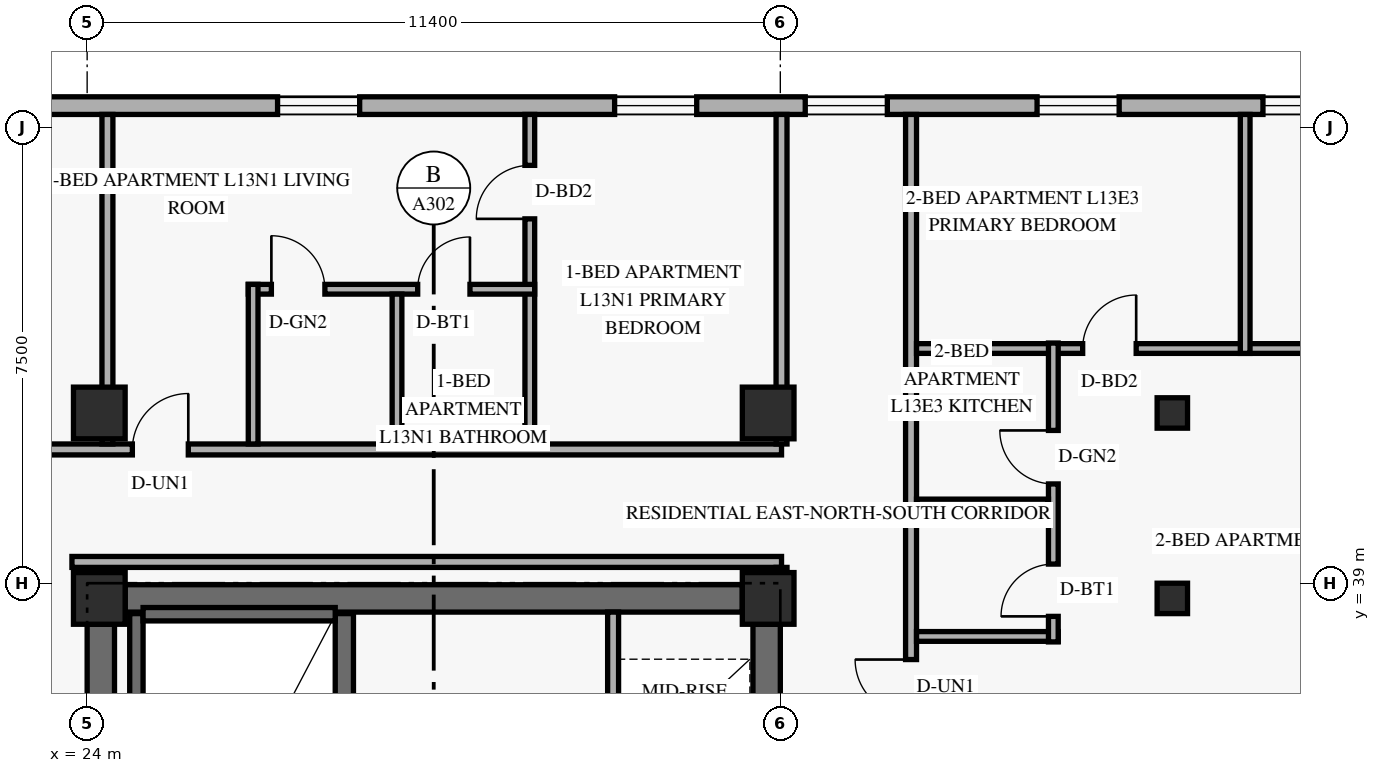
"""IFC4 building model, lengths in metres.
Left out: names, types, materials, properties, quantities, classifications, styles, units other than length and angle.
Written with IfcOpenShell. Run it as: python <this file> out.ifc"""

import sys

from ifc_helpers import new_model, si_unit, direction, frame, frame_2d, origin, origin_2d, place, context, subcontext, project, spatial, rectangle, hollow_rectangle, extrude, element, fill, save


model = new_model("IFC4")
c1 = context("Model", 3, precision=1e-05, world=origin(), true_north=direction((0.0, 1.0)))
c2 = subcontext(c1, "Body", "Model", "MODEL_VIEW")
j1 = project(units=[si_unit("LENGTHUNIT", "METRE"), si_unit("PLANEANGLEUNIT", "RADIAN")], contexts=[c1])
p1 = place(None, origin())
s1 = spatial("IfcSite", under=j1, at=p1, CompositionType="ELEMENT")
p2 = place(p1, origin())
s2 = spatial("IfcBuilding", under=s1, at=p2, CompositionType="ELEMENT")
p3 = place(p2, frame((0.0, 0.0, 52.8)))
s3 = spatial("IfcBuildingStorey", under=s2, at=p3, CompositionType="ELEMENT", Elevation=52.8)
p4 = place(p3, frame((24.225, 30.625, 0.0), z_axis=(0.0, 0.0, 1.0), x_axis=(0.0, 1.0, 0.0)))
e1 = element("IfcWall", 1, at=p4, inside=s3, PredefinedType="SHEAR", context=c2, shape_type="SweptSolid", body=[
    extrude(rectangle(XDim=7.7, YDim=0.45, at=frame_2d((3.85, 0.0))), origin(), (0.0, 0.0, 1.0), 2.667),
])
p5 = place(p3, frame((35.175, 31.35, 0.0), z_axis=(0.0, 0.0, 1.0), x_axis=(0.0, 1.0, 0.0)))
e2 = element("IfcWall", 2, at=p5, inside=s3, PredefinedType="SHEAR", context=c2, shape_type="SweptSolid", body=[
    extrude(rectangle(XDim=6.975, YDim=0.45, at=frame_2d((3.487, 0.0))), origin(), (0.0, 0.0, 1.0), 2.667),
])
p6 = place(p3, frame((24.625, 38.75, 0.0), z_axis=(0.0, 0.0, 1.0), x_axis=(1.0, 0.0, 0.0)))
e3 = element("IfcWall", 3, at=p6, inside=s3, PredefinedType="SHEAR", context=c2, shape_type="SweptSolid", body=[
    extrude(rectangle(XDim=10.15, YDim=0.45, at=frame_2d((5.075, 0.0))), origin(), (0.0, 0.0, 1.0), 3.36),
])
p7 = place(p3, frame((24.81, 30.74, 0.0), z_axis=(0.0, 0.0, 1.0), x_axis=(0.0, 1.0, 0.0)))
e4 = element("IfcWall", 4, at=p7, inside=s3, PredefinedType="SHEAR", context=c2, shape_type="SweptSolid", body=[
    extrude(rectangle(XDim=7.76, YDim=0.22, at=frame_2d((3.88, 0.0))), origin(), (0.0, 0.0, 1.0), 3.36),
])
p8 = place(p3, frame((28.23, 30.74, 0.0), z_axis=(0.0, 0.0, 1.0), x_axis=(0.0, 1.0, 0.0)))
e5 = element("IfcWall", 5, at=p8, inside=s3, PredefinedType="SHEAR", context=c2, shape_type="SweptSolid", body=[
    extrude(rectangle(XDim=7.76, YDim=0.3, at=frame_2d((3.88, 0.0))), origin(), (0.0, 0.0, 1.0), 3.36),
])
p9 = place(p3, frame((24.92, 38.49, 0.0), z_axis=(0.0, 0.0, 1.0), x_axis=(1.0, 0.0, 0.0)))
e6 = element("IfcWall", 6, at=p9, inside=s3, PredefinedType="SHEAR", context=c2, shape_type="SweptSolid", body=[
    extrude(rectangle(XDim=3.16, YDim=0.22, at=frame_2d((1.58, 0.0))), origin(), (0.0, 0.0, 1.0), 3.36),
])
for number, where, z_axis, x_axis in (
    (7, (24.2, 38.75, 0.0), (0.0, 0.0, 1.0), (1.0, 0.0, 0.0)),
    (8, (24.2, 41.8, 0.0), (0.0, 0.0, 1.0), (1.0, 0.0, 0.0)),
    (9, (35.2, 38.75, 0.0), (0.0, 0.0, 1.0), (1.0, 0.0, 0.0)),
    (10, (35.2, 41.8, 0.0), (0.0, 0.0, 1.0), (1.0, 0.0, 0.0)),
):
    element("IfcColumn", number, at=place(p3, frame(where, z_axis=z_axis, x_axis=x_axis)), inside=s3, PredefinedType="COLUMN", context=c2, shape_type="SweptSolid", body=[
        extrude(rectangle(XDim=0.85, YDim=0.85, at=origin_2d()), origin(), (0.0, 0.0, 1.0), 3.6),
    ])
for number, where, z_axis, x_axis in (
    (11, (41.784, 38.75, 0.0), (0.035, 0.0, 0.999), (0.0, 1.0, 0.0)),
    (12, (41.784, 41.8, 0.0), (0.035, 0.0, 0.999), (0.0, 1.0, 0.0)),
):
    element("IfcColumn", number, at=place(p3, frame(where, z_axis=z_axis, x_axis=x_axis)), inside=s3, PredefinedType="COLUMN", context=c2, shape_type="SweptSolid", body=[
        extrude(hollow_rectangle(XDim=0.5, YDim=0.5, WallThickness=0.022, at=origin_2d()), origin(), (0.0, 0.0, 1.0), 3.602),
    ])
p10 = place(p3, frame((44.98, 46.855, 0.0), z_axis=(0.0, 0.0, 1.0), x_axis=(-1.0, 0.0, 0.0)))
e13 = element("IfcWall", 13, at=p10, inside=s3, PredefinedType="SOLIDWALL", context=c2, shape_type="SweptSolid", body=[
    extrude(rectangle(XDim=39.56, YDim=0.29, at=frame_2d((19.78, 0.0))), origin(), (0.0, 0.0, 1.0), 3.36),
])
p11 = place(p10, frame((35.445, 0.0, 0.85)))
e14 = element("IfcOpeningElement", 14, at=p11, cuts=e13, PredefinedType="OPENING", context=c2, shape_type="SweptSolid", body=[
    extrude(rectangle(XDim=1.35, YDim=1.55, at=frame_2d((0.675, 0.775))), frame((0.0, 0.155, 0.0), z_axis=(0.0, -1.0, 0.0), x_axis=(1.0, 0.0, 0.0)), (0.0, 0.0, 1.0), 0.31),
])
p12 = place(p10, frame((31.18, 0.0, 0.85)))
e15 = element("IfcOpeningElement", 15, at=p12, cuts=e13, PredefinedType="OPENING", context=c2, shape_type="SweptSolid", body=[
    extrude(rectangle(XDim=1.2, YDim=1.5, at=frame_2d((0.6, 0.75))), frame((0.0, 0.155, 0.0), z_axis=(0.0, -1.0, 0.0), x_axis=(1.0, 0.0, 0.0)), (0.0, 0.0, 1.0), 0.31),
])
p13 = place(p10, frame((25.088, 0.0, 0.85)))
e16 = element("IfcOpeningElement", 16, at=p13, cuts=e13, PredefinedType="OPENING", context=c2, shape_type="SweptSolid", body=[
    extrude(rectangle(XDim=1.35, YDim=1.55, at=frame_2d((0.675, 0.775))), frame((0.0, 0.155, 0.0), z_axis=(0.0, -1.0, 0.0), x_axis=(1.0, 0.0, 0.0)), (0.0, 0.0, 1.0), 0.31),
])
p14 = place(p10, frame((16.498, 0.0, 0.85)))
e17 = element("IfcOpeningElement", 17, at=p14, cuts=e13, PredefinedType="OPENING", context=c2, shape_type="SweptSolid", body=[
    extrude(rectangle(XDim=1.35, YDim=1.55, at=frame_2d((0.675, 0.775))), frame((0.0, 0.155, 0.0), z_axis=(0.0, -1.0, 0.0), x_axis=(1.0, 0.0, 0.0)), (0.0, 0.0, 1.0), 0.31),
])
p15 = place(p10, frame((10.955, 0.0, 0.85)))
e18 = element("IfcOpeningElement", 18, at=p15, cuts=e13, PredefinedType="OPENING", context=c2, shape_type="SweptSolid", body=[
    extrude(rectangle(XDim=1.35, YDim=1.55, at=frame_2d((0.675, 0.775))), frame((0.0, 0.155, 0.0), z_axis=(0.0, -1.0, 0.0), x_axis=(1.0, 0.0, 0.0)), (0.0, 0.0, 1.0), 0.31),
])
p16 = place(p10, frame((7.82, 0.0, 0.85)))
e19 = element("IfcOpeningElement", 19, at=p16, cuts=e13, PredefinedType="OPENING", context=c2, shape_type="SweptSolid", body=[
    extrude(rectangle(XDim=1.35, YDim=1.55, at=frame_2d((0.675, 0.775))), frame((0.0, 0.155, 0.0), z_axis=(0.0, -1.0, 0.0), x_axis=(1.0, 0.0, 0.0)), (0.0, 0.0, 1.0), 0.31),
])
p17 = place(p10, frame((4.008, 0.0, 0.85)))
e20 = element("IfcOpeningElement", 20, at=p17, cuts=e13, PredefinedType="OPENING", context=c2, shape_type="SweptSolid", body=[
    extrude(rectangle(XDim=1.35, YDim=1.55, at=frame_2d((0.675, 0.775))), frame((0.0, 0.155, 0.0), z_axis=(0.0, -1.0, 0.0), x_axis=(1.0, 0.0, 0.0)), (0.0, 0.0, 1.0), 0.31),
])
p18 = place(p10, frame((0.292, 0.0, 0.85)))
e21 = element("IfcOpeningElement", 21, at=p18, cuts=e13, PredefinedType="OPENING", context=c2, shape_type="SweptSolid", body=[
    extrude(rectangle(XDim=1.35, YDim=1.55, at=frame_2d((0.675, 0.775))), frame((0.0, 0.155, 0.0), z_axis=(0.0, -1.0, 0.0), x_axis=(1.0, 0.0, 0.0)), (0.0, 0.0, 1.0), 0.31),
])
p19 = place(p3, frame((32.65, 31.35, 0.0), z_axis=(0.0, 0.0, 1.0), x_axis=(0.0, 1.0, 0.0)))
e22 = element("IfcWall", 22, at=p19, inside=s3, PredefinedType="STANDARD", context=c2, shape_type="SweptSolid", body=[
    extrude(rectangle(XDim=7.175, YDim=0.18, at=frame_2d((3.587, 0.0))), origin(), (0.0, 0.0, 1.0), 3.36),
])
p20 = place(p3, frame((37.55, 1.29, 0.0), z_axis=(0.0, 0.0, 1.0), x_axis=(0.0, 1.0, 0.0)))
e23 = element("IfcWall", 23, at=p20, inside=s3, PredefinedType="STANDARD", context=c2, shape_type="SweptSolid", body=[
    extrude(rectangle(XDim=45.42, YDim=0.18, at=frame_2d((22.71, 0.0))), origin(), (0.0, 0.0, 1.0), 2.649),
])
p21 = place(p20, frame((9.87, 0.0, 0.0)))
e24 = element("IfcOpeningElement", 24, at=p21, cuts=e23, PredefinedType="OPENING", context=c2, shape_type="SweptSolid", body=[
    extrude(rectangle(XDim=0.92, YDim=2.15, at=frame_2d((0.46, 1.075))), frame((0.0, 0.1, 0.0), z_axis=(0.0, -1.0, 0.0), x_axis=(1.0, 0.0, 0.0)), (0.0, 0.0, 1.0), 0.2),
])
p22 = place(p20, frame((20.953, 0.0, 0.0)))
e25 = element("IfcOpeningElement", 25, at=p22, cuts=e23, PredefinedType="OPENING", context=c2, shape_type="SweptSolid", body=[
    extrude(rectangle(XDim=0.92, YDim=2.15, at=frame_2d((0.46, 1.075))), frame((0.0, 0.1, 0.0), z_axis=(0.0, -1.0, 0.0), x_axis=(1.0, 0.0, 0.0)), (0.0, 0.0, 1.0), 0.2),
])
p23 = place(p20, frame((35.534, 0.0, 0.0)))
e26 = element("IfcOpeningElement", 26, at=p23, cuts=e23, PredefinedType="OPENING", context=c2, shape_type="SweptSolid", body=[
    extrude(rectangle(XDim=0.92, YDim=2.15, at=frame_2d((0.46, 1.075))), frame((0.0, 0.1, 0.0), z_axis=(0.0, -1.0, 0.0), x_axis=(1.0, 0.0, 0.0)), (0.0, 0.0, 1.0), 0.2),
])
p24 = place(p3, frame((14.1, 41.2, 0.0), z_axis=(0.0, 0.0, 1.0), x_axis=(1.0, 0.0, 0.0)))
e27 = element("IfcWall", 27, at=p24, inside=s3, PredefinedType="STANDARD", context=c2, shape_type="SweptSolid", body=[
    extrude(rectangle(XDim=21.32, YDim=0.18, at=frame_2d((10.66, 0.0))), origin(), (0.0, 0.0, 1.0), 2.649),
])
p25 = place(p24, frame((1.6, 0.0, 0.0)))
e28 = element("IfcOpeningElement", 28, at=p25, cuts=e27, PredefinedType="OPENING", context=c2, shape_type="SweptSolid", body=[
    extrude(rectangle(XDim=0.95, YDim=2.15, at=frame_2d((0.475, 1.075))), frame((0.0, 0.1, 0.0), z_axis=(0.0, -1.0, 0.0), x_axis=(1.0, 0.0, 0.0)), (0.0, 0.0, 1.0), 0.2),
])
p26 = place(p24, frame((10.644, 0.0, 0.0)))
e29 = element("IfcOpeningElement", 29, at=p26, cuts=e27, PredefinedType="OPENING", context=c2, shape_type="SweptSolid", body=[
    extrude(rectangle(XDim=0.92, YDim=2.15, at=frame_2d((0.46, 1.075))), frame((0.0, 0.1, 0.0), z_axis=(0.0, -1.0, 0.0), x_axis=(1.0, 0.0, 0.0)), (0.0, 0.0, 1.0), 0.2),
])
p27 = place(p3, frame((23.75, 39.35, 0.0), z_axis=(0.0, 0.0, 1.0), x_axis=(1.0, 0.0, 0.0)))
e30 = element("IfcWall", 30, at=p27, inside=s3, PredefinedType="STANDARD", context=c2, shape_type="SweptSolid", body=[
    extrude(rectangle(XDim=11.67, YDim=0.18, at=frame_2d((5.835, 0.0))), origin(), (0.0, 0.0, 1.0), 2.649),
])
p28 = place(p3, frame((35.42, 38.75, 0.0), z_axis=(0.0, 0.0, 1.0), x_axis=(0.0, 1.0, 0.0)))
e31 = element("IfcWall", 31, at=p28, inside=s3, PredefinedType="STANDARD", context=c2, shape_type="SweptSolid", body=[
    extrude(rectangle(XDim=0.51, YDim=0.18, at=frame_2d((0.255, 0.0))), origin(), (0.0, 0.0, 1.0), 3.36),
])
p29 = place(p3, frame((35.42, 41.29, 0.0), z_axis=(0.0, 0.0, 1.0), x_axis=(0.0, 1.0, 0.0)))
e32 = element("IfcWall", 32, at=p29, inside=s3, PredefinedType="PARTITIONING", context=c2, shape_type="SweptSolid", body=[
    extrude(rectangle(XDim=5.42, YDim=0.18, at=frame_2d((2.71, 0.0))), origin(), (0.0, 0.0, 1.0), 3.36),
])
p30 = place(p3, frame((37.64, 42.86, 0.0), z_axis=(0.0, 0.0, 1.0), x_axis=(1.0, 0.0, 0.0)))
e33 = element("IfcWall", 33, at=p30, inside=s3, PredefinedType="PARTITIONING", context=c2, shape_type="SweptSolid", body=[
    extrude(rectangle(XDim=10.67, YDim=0.16, at=frame_2d((5.335, 0.0))), origin(), (0.0, 0.0, 1.0), 3.36),
])
p31 = place(p30, frame((2.732, 0.0, 0.0)))
e34 = element("IfcOpeningElement", 34, at=p31, cuts=e33, PredefinedType="OPENING", context=c2, shape_type="SweptSolid", body=[
    extrude(rectangle(XDim=0.88, YDim=2.14, at=frame_2d((0.44, 1.07))), frame((0.0, 0.09, 0.0), z_axis=(0.0, -1.0, 0.0), x_axis=(1.0, 0.0, 0.0)), (0.0, 0.0, 1.0), 0.18),
])
p32 = place(p30, frame((8.833, 0.0, 0.0)))
e35 = element("IfcOpeningElement", 35, at=p32, cuts=e33, PredefinedType="OPENING", context=c2, shape_type="SweptSolid", body=[
    extrude(rectangle(XDim=0.88, YDim=2.14, at=frame_2d((0.44, 1.07))), frame((0.0, 0.09, 0.0), z_axis=(0.0, -1.0, 0.0), x_axis=(1.0, 0.0, 0.0)), (0.0, 0.0, 1.0), 0.18),
])
p33 = place(p3, frame((37.64, 38.125, 0.0), z_axis=(0.0, 0.0, 1.0), x_axis=(1.0, 0.0, 0.0)))
e36 = element("IfcWall", 36, at=p33, inside=s3, PredefinedType="PLUMBINGWALL", context=c2, shape_type="SweptSolid", body=[
    extrude(rectangle(XDim=2.33, YDim=0.16, at=frame_2d((1.165, 0.0))), origin(), (0.0, 0.0, 1.0), 3.36),
])
p34 = place(p3, frame((39.89, 38.034, 0.0), z_axis=(0.0, 0.0, 1.0), x_axis=(0.0, 1.0, 0.0)))
e37 = element("IfcWall", 37, at=p34, inside=s3, PredefinedType="PLUMBINGWALL", context=c2, shape_type="SweptSolid", body=[
    extrude(rectangle(XDim=4.916, YDim=0.16, at=frame_2d((2.458, 0.0))), origin(), (0.0, 0.0, 1.0), 2.649),
])
p35 = place(p34, frame((0.42, 0.0, 0.0)))
e38 = element("IfcOpeningElement", 38, at=p35, cuts=e37, PredefinedType="OPENING", context=c2, shape_type="SweptSolid", body=[
    extrude(rectangle(XDim=0.86, YDim=2.12, at=frame_2d((0.43, 1.06))), frame((0.0, 0.09, 0.0), z_axis=(0.0, -1.0, 0.0), x_axis=(1.0, 0.0, 0.0)), (0.0, 0.0, 1.0), 0.18),
])
p36 = place(p34, frame((2.598, 0.0, 0.0)))
e39 = element("IfcOpeningElement", 39, at=p36, cuts=e37, PredefinedType="OPENING", context=c2, shape_type="SweptSolid", body=[
    extrude(rectangle(XDim=0.88, YDim=2.12, at=frame_2d((0.44, 1.06))), frame((0.0, 0.09, 0.0), z_axis=(0.0, -1.0, 0.0), x_axis=(1.0, 0.0, 0.0)), (0.0, 0.0, 1.0), 0.18),
])
p37 = place(p3, frame((37.64, 40.303, 0.0), z_axis=(0.0, 0.0, 1.0), x_axis=(1.0, 0.0, 0.0)))
e40 = element("IfcWall", 40, at=p37, inside=s3, PredefinedType="PLUMBINGWALL", context=c2, shape_type="SweptSolid", body=[
    extrude(rectangle(XDim=2.17, YDim=0.16, at=frame_2d((1.085, 0.0))), origin(), (0.0, 0.0, 1.0), 3.36),
])
p38 = place(p3, frame((43.045, 42.78, 0.0), z_axis=(0.0, 0.0, 1.0), x_axis=(0.0, 1.0, 0.0)))
e41 = element("IfcWall", 41, at=p38, inside=s3, PredefinedType="PARTITIONING", context=c2, shape_type="SweptSolid", body=[
    extrude(rectangle(XDim=3.93, YDim=0.16, at=frame_2d((1.965, 0.0))), origin(), (0.0, 0.0, 1.0), 3.36),
])
p39 = place(p3, frame((24.333, 41.29, 0.0), z_axis=(0.0, 0.0, 1.0), x_axis=(0.0, 1.0, 0.0)))
e42 = element("IfcWall", 42, at=p39, inside=s3, PredefinedType="PARTITIONING", context=c2, shape_type="SweptSolid", body=[
    extrude(rectangle(XDim=5.42, YDim=0.18, at=frame_2d((2.71, 0.0))), origin(), (0.0, 0.0, 1.0), 2.649),
])
p40 = place(p3, frame((31.28, 41.29, 0.0), z_axis=(0.0, 0.0, 1.0), x_axis=(0.0, 1.0, 0.0)))
e43 = element("IfcWall", 43, at=p40, inside=s3, PredefinedType="PARTITIONING", context=c2, shape_type="SweptSolid", body=[
    extrude(rectangle(XDim=5.42, YDim=0.16, at=frame_2d((2.71, 0.0))), origin(), (0.0, 0.0, 1.0), 2.809),
])
p41 = place(p40, frame((3.702, 0.0, 0.0)))
e44 = element("IfcOpeningElement", 44, at=p41, cuts=e43, PredefinedType="OPENING", context=c2, shape_type="SweptSolid", body=[
    extrude(rectangle(XDim=0.88, YDim=2.14, at=frame_2d((0.44, 1.07))), frame((0.0, 0.09, 0.0), z_axis=(0.0, -1.0, 0.0), x_axis=(1.0, 0.0, 0.0)), (0.0, 0.0, 1.0), 0.18),
])
p42 = place(p3, frame((26.65, 43.835, 0.0), z_axis=(0.0, 0.0, 1.0), x_axis=(1.0, 0.0, 0.0)))
e45 = element("IfcWall", 45, at=p42, inside=s3, PredefinedType="PLUMBINGWALL", context=c2, shape_type="SweptSolid", body=[
    extrude(rectangle(XDim=4.71, YDim=0.16, at=frame_2d((2.355, 0.0))), origin(), (0.0, 0.0, 1.0), 3.36),
])
p43 = place(p42, frame((0.38, 0.0, 0.0)))
e46 = element("IfcOpeningElement", 46, at=p43, cuts=e45, PredefinedType="OPENING", context=c2, shape_type="SweptSolid", body=[
    extrude(rectangle(XDim=0.88, YDim=2.12, at=frame_2d((0.44, 1.06))), frame((0.0, 0.09, 0.0), z_axis=(0.0, -1.0, 0.0), x_axis=(1.0, 0.0, 0.0)), (0.0, 0.0, 1.0), 0.18),
])
p44 = place(p42, frame((2.786, 0.0, 0.0)))
e47 = element("IfcOpeningElement", 47, at=p44, cuts=e45, PredefinedType="OPENING", context=c2, shape_type="SweptSolid", body=[
    extrude(rectangle(XDim=0.86, YDim=2.12, at=frame_2d((0.43, 1.06))), frame((0.0, 0.09, 0.0), z_axis=(0.0, -1.0, 0.0), x_axis=(1.0, 0.0, 0.0)), (0.0, 0.0, 1.0), 0.18),
])
p45 = place(p3, frame((26.73, 41.29, 0.0), z_axis=(0.0, 0.0, 1.0), x_axis=(0.0, 1.0, 0.0)))
e48 = element("IfcWall", 48, at=p45, inside=s3, PredefinedType="PLUMBINGWALL", context=c2, shape_type="SweptSolid", body=[
    extrude(rectangle(XDim=2.625, YDim=0.16, at=frame_2d((1.312, 0.0))), origin(), (0.0, 0.0, 1.0), 2.809),
])
p46 = place(p3, frame((29.096, 41.29, 0.0), z_axis=(0.0, 0.0, 1.0), x_axis=(0.0, 1.0, 0.0)))
e49 = element("IfcWall", 49, at=p46, inside=s3, PredefinedType="PLUMBINGWALL", context=c2, shape_type="SweptSolid", body=[
    extrude(rectangle(XDim=2.465, YDim=0.16, at=frame_2d((1.232, 0.0))), origin(), (0.0, 0.0, 1.0), 2.809),
])
p47 = place(p14, origin())
e50 = element("IfcWindow", 50, at=p47, inside=s3, PartitioningType="SINGLE_PANEL", PredefinedType="WINDOW", context=c2, shape_type="SweptSolid", body=[
    extrude(rectangle(XDim=1.35, YDim=1.55, at=frame_2d((0.675, 0.775))), frame((0.0, 0.03, 0.0), z_axis=(0.0, -1.0, 0.0), x_axis=(1.0, 0.0, 0.0)), (0.0, 0.0, 1.0), 0.06),
])
fill(e17, e50)
p48 = place(p15, origin())
e51 = element("IfcWindow", 51, at=p48, inside=s3, PartitioningType="SINGLE_PANEL", PredefinedType="WINDOW", context=c2, shape_type="SweptSolid", body=[
    extrude(rectangle(XDim=1.35, YDim=1.55, at=frame_2d((0.675, 0.775))), frame((0.0, 0.03, 0.0), z_axis=(0.0, -1.0, 0.0), x_axis=(1.0, 0.0, 0.0)), (0.0, 0.0, 1.0), 0.06),
])
fill(e18, e51)
p49 = place(p16, origin())
e52 = element("IfcWindow", 52, at=p49, inside=s3, PartitioningType="SINGLE_PANEL", PredefinedType="WINDOW", context=c2, shape_type="SweptSolid", body=[
    extrude(rectangle(XDim=1.35, YDim=1.55, at=frame_2d((0.675, 0.775))), frame((0.0, 0.03, 0.0), z_axis=(0.0, -1.0, 0.0), x_axis=(1.0, 0.0, 0.0)), (0.0, 0.0, 1.0), 0.06),
])
fill(e19, e52)
p50 = place(p17, origin())
e53 = element("IfcWindow", 53, at=p50, inside=s3, PartitioningType="SINGLE_PANEL", PredefinedType="WINDOW", context=c2, shape_type="SweptSolid", body=[
    extrude(rectangle(XDim=1.35, YDim=1.55, at=frame_2d((0.675, 0.775))), frame((0.0, 0.03, 0.0), z_axis=(0.0, -1.0, 0.0), x_axis=(1.0, 0.0, 0.0)), (0.0, 0.0, 1.0), 0.06),
])
fill(e20, e53)
p51 = place(p18, origin())
e54 = element("IfcWindow", 54, at=p51, inside=s3, PartitioningType="SINGLE_PANEL", PredefinedType="WINDOW", context=c2, shape_type="SweptSolid", body=[
    extrude(rectangle(XDim=1.35, YDim=1.55, at=frame_2d((0.675, 0.775))), frame((0.0, 0.03, 0.0), z_axis=(0.0, -1.0, 0.0), x_axis=(1.0, 0.0, 0.0)), (0.0, 0.0, 1.0), 0.06),
])
fill(e21, e54)
p52 = place(p23, origin())
e55 = element("IfcDoor", 55, at=p52, inside=s3, OperationType="SINGLE_SWING_RIGHT", PredefinedType="DOOR", context=c2, shape_type="SweptSolid", body=[
    extrude(rectangle(XDim=0.92, YDim=2.15, at=frame_2d((0.46, 1.075))), frame((0.0, 0.025, 0.0), z_axis=(0.0, -1.0, 0.0), x_axis=(1.0, 0.0, 0.0)), (0.0, 0.0, 1.0), 0.05),
])
fill(e26, e55)
p53 = place(p35, origin())
e56 = element("IfcDoor", 56, at=p53, inside=s3, OperationType="SINGLE_SWING_LEFT", PredefinedType="DOOR", context=c2, shape_type="SweptSolid", body=[
    extrude(rectangle(XDim=0.86, YDim=2.12, at=frame_2d((0.43, 1.06))), frame((0.0, 0.025, 0.0), z_axis=(0.0, -1.0, 0.0), x_axis=(1.0, 0.0, 0.0)), (0.0, 0.0, 1.0), 0.05),
])
fill(e38, e56)
p54 = place(p36, origin())
e57 = element("IfcDoor", 57, at=p54, inside=s3, OperationType="SINGLE_SWING_RIGHT", PredefinedType="DOOR", context=c2, shape_type="SweptSolid", body=[
    extrude(rectangle(XDim=0.88, YDim=2.12, at=frame_2d((0.44, 1.06))), frame((0.0, 0.025, 0.0), z_axis=(0.0, -1.0, 0.0), x_axis=(1.0, 0.0, 0.0)), (0.0, 0.0, 1.0), 0.05),
])
fill(e39, e57)
p55 = place(p31, origin())
e58 = element("IfcDoor", 58, at=p55, inside=s3, OperationType="SINGLE_SWING_RIGHT", PredefinedType="DOOR", context=c2, shape_type="SweptSolid", body=[
    extrude(rectangle(XDim=0.88, YDim=2.14, at=frame_2d((0.44, 1.07))), frame((0.0, 0.025, 0.0), z_axis=(0.0, -1.0, 0.0), x_axis=(1.0, 0.0, 0.0)), (0.0, 0.0, 1.0), 0.05),
])
fill(e34, e58)
p56 = place(p26, origin())
e59 = element("IfcDoor", 59, at=p56, inside=s3, OperationType="SINGLE_SWING_RIGHT", PredefinedType="DOOR", context=c2, shape_type="SweptSolid", body=[
    extrude(rectangle(XDim=0.92, YDim=2.15, at=frame_2d((0.46, 1.075))), frame((0.0, 0.025, 0.0), z_axis=(0.0, -1.0, 0.0), x_axis=(1.0, 0.0, 0.0)), (0.0, 0.0, 1.0), 0.05),
])
fill(e29, e59)
p57 = place(p43, origin())
e60 = element("IfcDoor", 60, at=p57, inside=s3, OperationType="SINGLE_SWING_LEFT", PredefinedType="DOOR", context=c2, shape_type="SweptSolid", body=[
    extrude(rectangle(XDim=0.88, YDim=2.12, at=frame_2d((0.44, 1.06))), frame((0.0, 0.025, 0.0), z_axis=(0.0, -1.0, 0.0), x_axis=(1.0, 0.0, 0.0)), (0.0, 0.0, 1.0), 0.05),
])
fill(e46, e60)
p58 = place(p44, origin())
e61 = element("IfcDoor", 61, at=p58, inside=s3, OperationType="SINGLE_SWING_RIGHT", PredefinedType="DOOR", context=c2, shape_type="SweptSolid", body=[
    extrude(rectangle(XDim=0.86, YDim=2.12, at=frame_2d((0.43, 1.06))), frame((0.0, 0.025, 0.0), z_axis=(0.0, -1.0, 0.0), x_axis=(1.0, 0.0, 0.0)), (0.0, 0.0, 1.0), 0.05),
])
fill(e47, e61)
p59 = place(p41, origin())
e62 = element("IfcDoor", 62, at=p59, inside=s3, OperationType="SINGLE_SWING_LEFT", PredefinedType="DOOR", context=c2, shape_type="SweptSolid", body=[
    extrude(rectangle(XDim=0.88, YDim=2.14, at=frame_2d((0.44, 1.07))), frame((0.0, 0.025, 0.0), z_axis=(0.0, -1.0, 0.0), x_axis=(1.0, 0.0, 0.0)), (0.0, 0.0, 1.0), 0.05),
])
fill(e44, e62)
save(model, sys.argv[1])
